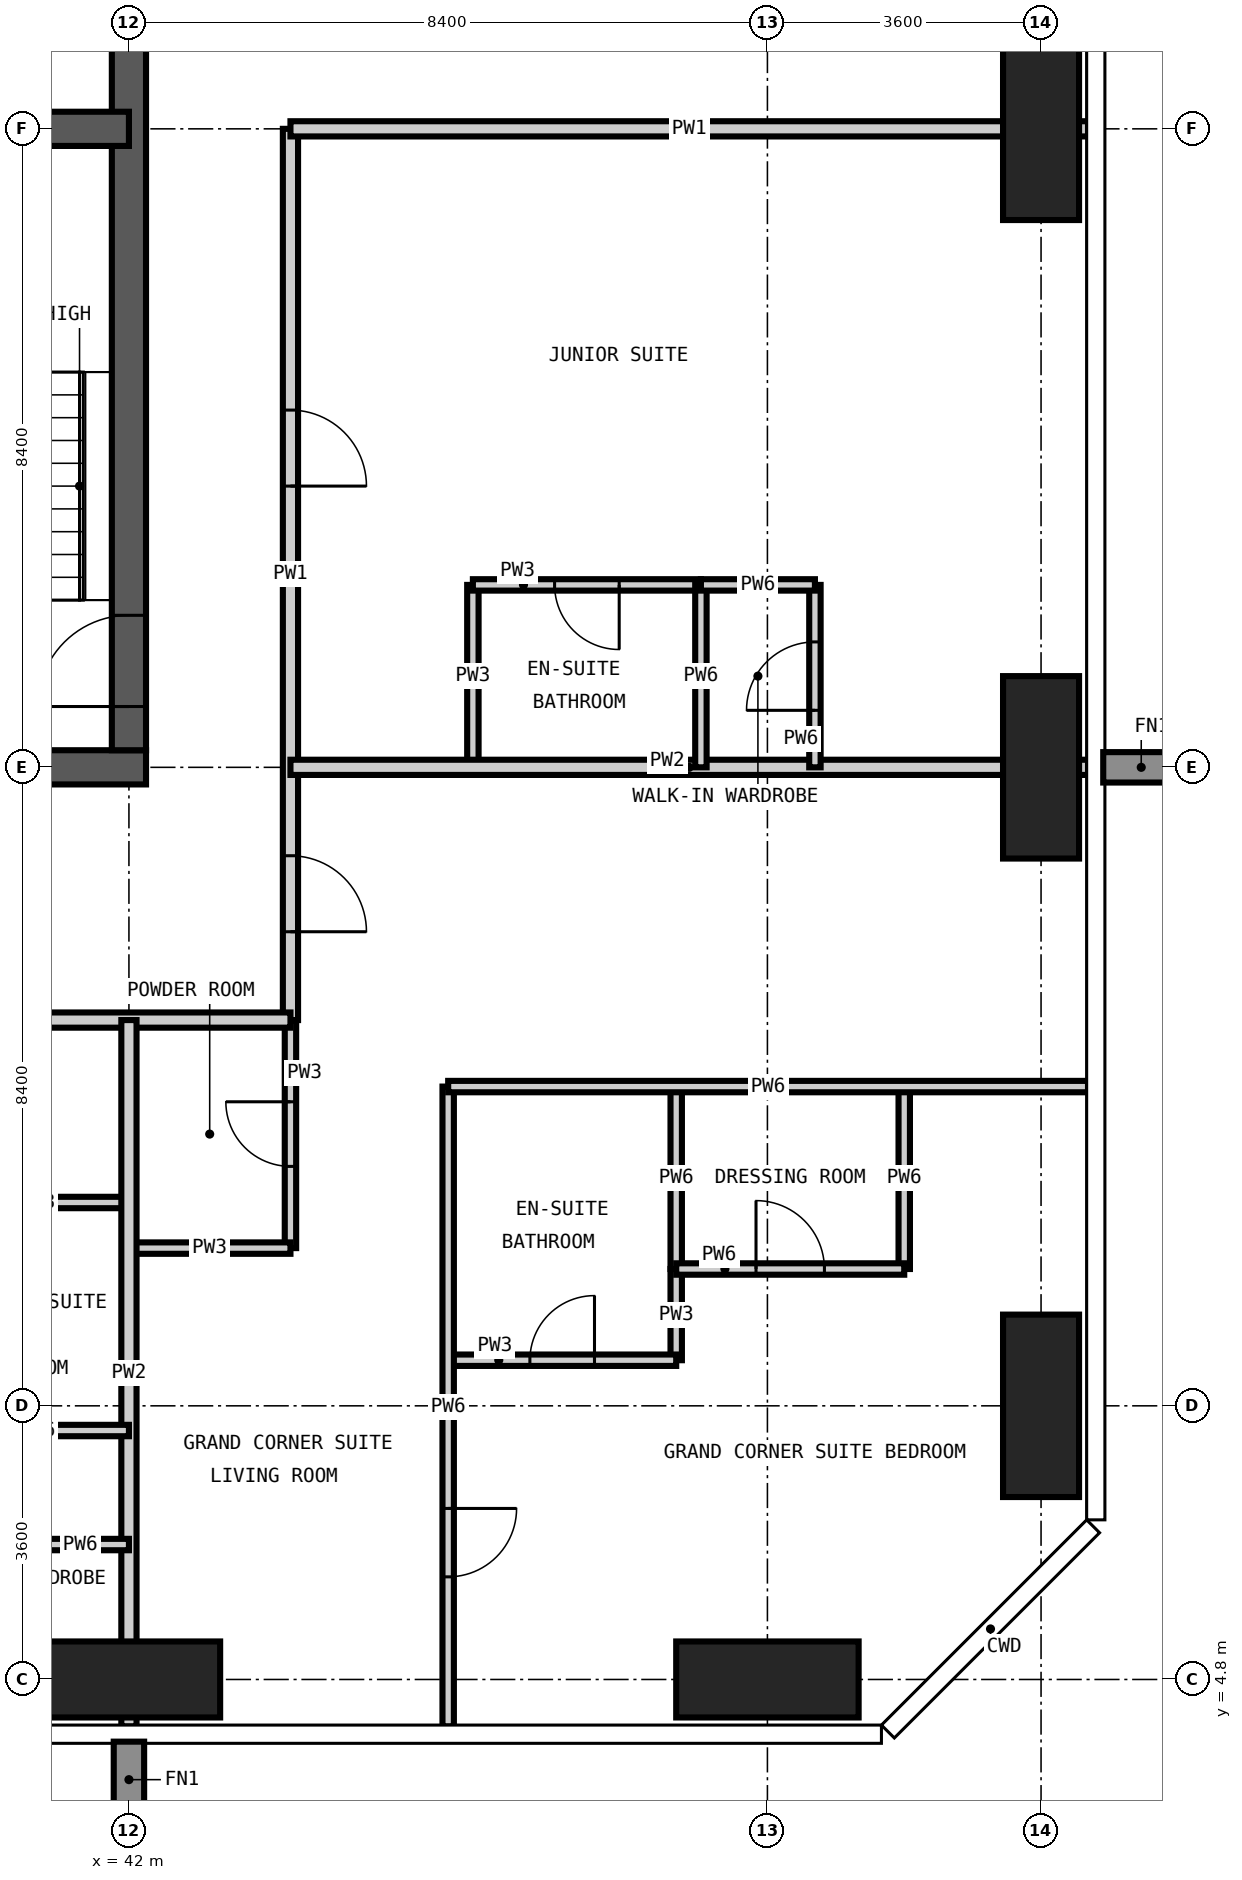
"""IFC4 building model, lengths in metres.
Left out: names, types, materials, properties, quantities, classifications, styles, units other than length and angle.
Written with IfcOpenShell. Run it as: python <this file> out.ifc"""

import sys

from ifc_helpers import new_model, si_unit, direction, frame, frame_2d, origin, origin_2d, place, context, subcontext, project, spatial, rectangle, extrude, element, fill, save


model = new_model("IFC4")
c1 = context("Model", 3, precision=1e-05, world=origin(), true_north=direction((0.0, 1.0)))
c2 = subcontext(c1, "Body", "Model", "MODEL_VIEW")
j1 = project(units=[si_unit("LENGTHUNIT", "METRE"), si_unit("PLANEANGLEUNIT", "RADIAN")], contexts=[c1])
p1 = place(None, origin())
s1 = spatial("IfcSite", under=j1, at=p1, CompositionType="ELEMENT")
p2 = place(p1, origin())
s2 = spatial("IfcBuilding", under=s1, at=p2, CompositionType="ELEMENT")
p3 = place(p2, frame((0.0, 0.0, 276.3)))
s3 = spatial("IfcBuildingStorey", under=s2, at=p3, CompositionType="ELEMENT", Elevation=276.3)
for number, where, z_axis, x_axis in (
    (1, (42.0, 4.8, -0.35), (0.0, 0.0, 1.0), (1.0, 0.0, 0.0)),
    (2, (50.4, 4.8, -0.35), (0.0, 0.0, 1.0), (1.0, 0.0, 0.0)),
):
    element("IfcColumn", number, at=place(p3, frame(where, z_axis=z_axis, x_axis=x_axis)), inside=s3, PredefinedType="COLUMN", context=c2, shape_type="SweptSolid", body=[
        extrude(rectangle(XDim=2.4, YDim=1.0, at=origin_2d()), origin(), (0.0, 0.0, 1.0), 3.9),
    ])
for number, where, z_axis, x_axis in (
    (3, (54.0, 8.4, -0.35), (0.0, 0.0, 1.0), (1.0, 0.0, 0.0)),
    (4, (54.0, 16.8, -0.35), (0.0, 0.0, 1.0), (1.0, 0.0, 0.0)),
    (5, (54.0, 25.2, -0.35), (0.0, 0.0, 1.0), (1.0, 0.0, 0.0)),
):
    element("IfcColumn", number, at=place(p3, frame(where, z_axis=z_axis, x_axis=x_axis)), inside=s3, PredefinedType="COLUMN", context=c2, shape_type="SweptSolid", body=[
        extrude(rectangle(XDim=1.0, YDim=2.4, at=origin_2d()), origin(), (0.0, 0.0, 1.0), 3.9),
    ])
p4 = place(p3, frame((24.975, 16.8, -0.35), z_axis=(0.0, 0.0, 1.0), x_axis=(1.0, 0.0, 0.0)))
e6 = element("IfcWall", 6, at=p4, inside=s3, PredefinedType="SHEAR", context=c2, shape_type="SweptSolid", body=[
    extrude(rectangle(XDim=17.25, YDim=0.45, at=frame_2d((8.625, 0.0))), origin(), (0.0, 0.0, 1.0), 3.9),
])
p5 = place(p4, frame((3.925, 0.0, 0.35)))
e7 = element("IfcOpeningElement", 7, at=p5, cuts=e6, PredefinedType="OPENING", context=c2, shape_type="SweptSolid", body=[
    extrude(rectangle(XDim=1.0, YDim=2.1, at=frame_2d((0.5, 1.05))), frame((0.0, 0.235, 0.0), z_axis=(0.0, -1.0, 0.0), x_axis=(1.0, 0.0, 0.0)), (0.0, 0.0, 1.0), 0.47),
])
p6 = place(p4, frame((10.225, 0.0, 0.35)))
e8 = element("IfcOpeningElement", 8, at=p6, cuts=e6, PredefinedType="OPENING", context=c2, shape_type="SweptSolid", body=[
    extrude(rectangle(XDim=1.0, YDim=2.1, at=frame_2d((0.5, 1.05))), frame((0.0, 0.235, 0.0), z_axis=(0.0, -1.0, 0.0), x_axis=(1.0, 0.0, 0.0)), (0.0, 0.0, 1.0), 0.47),
])
p7 = place(p3, frame((42.0, 17.025, -0.35), z_axis=(0.0, 0.0, 1.0), x_axis=(0.0, 1.0, 0.0)))
e9 = element("IfcWall", 9, at=p7, inside=s3, PredefinedType="SHEAR", context=c2, shape_type="SweptSolid", body=[
    extrude(rectangle(XDim=24.75, YDim=0.45, at=frame_2d((12.375, 0.0))), origin(), (0.0, 0.0, 1.0), 3.9),
])
p8 = place(p7, frame((0.575, 0.0, 0.35)))
e10 = element("IfcOpeningElement", 10, at=p8, cuts=e9, PredefinedType="OPENING", context=c2, shape_type="SweptSolid", body=[
    extrude(rectangle(XDim=1.2, YDim=2.2, at=frame_2d((0.6, 1.1))), frame((0.0, 0.235, 0.0), z_axis=(0.0, -1.0, 0.0), x_axis=(1.0, 0.0, 0.0)), (0.0, 0.0, 1.0), 0.47),
])
p9 = place(p7, frame((11.475, 0.0, 0.35)))
e11 = element("IfcOpeningElement", 11, at=p9, cuts=e9, PredefinedType="OPENING", context=c2, shape_type="SweptSolid", body=[
    extrude(rectangle(XDim=1.8, YDim=2.2, at=frame_2d((0.9, 1.1))), frame((0.0, 0.235, 0.0), z_axis=(0.0, -1.0, 0.0), x_axis=(1.0, 0.0, 0.0)), (0.0, 0.0, 1.0), 0.47),
])
p10 = place(p7, frame((20.275, 0.0, 0.35)))
e12 = element("IfcOpeningElement", 12, at=p10, cuts=e9, PredefinedType="OPENING", context=c2, shape_type="SweptSolid", body=[
    extrude(rectangle(XDim=1.0, YDim=2.1, at=frame_2d((0.5, 1.05))), frame((0.0, 0.235, 0.0), z_axis=(0.0, -1.0, 0.0), x_axis=(1.0, 0.0, 0.0)), (0.0, 0.0, 1.0), 0.47),
])
p11 = place(p3, frame((25.2, 25.2, -0.35), z_axis=(0.0, 0.0, 1.0), x_axis=(1.0, 0.0, 0.0)))
e13 = element("IfcWall", 13, at=p11, inside=s3, PredefinedType="SHEAR", context=c2, shape_type="SweptSolid", body=[
    extrude(rectangle(XDim=16.8, YDim=0.45, at=frame_2d((8.4, 0.0))), origin(), (0.0, 0.0, 1.0), 3.9),
])
p12 = place(p3, frame((44.125, 10.475, 0.0), z_axis=(0.0, 0.0, 1.0), x_axis=(0.0, 1.0, 0.0)))
e14 = element("IfcWall", 14, at=p12, inside=s3, PredefinedType="PARTITIONING", context=c2, shape_type="SweptSolid", body=[
    extrude(rectangle(XDim=3.0, YDim=0.15, at=frame_2d((1.5, 0.0))), origin(), (0.0, 0.0, 1.0), 3.55),
])
p13 = place(p12, frame((1.075, 0.0, 0.0)))
e15 = element("IfcOpeningElement", 15, at=p13, cuts=e14, PredefinedType="OPENING", context=c2, shape_type="SweptSolid", body=[
    extrude(rectangle(XDim=0.85, YDim=2.1, at=frame_2d((0.425, 1.05))), frame((0.0, 0.085, 0.0), z_axis=(0.0, -1.0, 0.0), x_axis=(1.0, 0.0, 0.0)), (0.0, 0.0, 1.0), 0.17),
])
p14 = place(p3, frame((46.525, 16.8, 0.0), z_axis=(0.0, 0.0, 1.0), x_axis=(0.0, 1.0, 0.0)))
e16 = element("IfcWall", 16, at=p14, inside=s3, PredefinedType="PARTITIONING", context=c2, shape_type="SweptSolid", body=[
    extrude(rectangle(XDim=2.4, YDim=0.15, at=frame_2d((1.2, 0.0))), origin(), (0.0, 0.0, 1.0), 3.55),
])
p15 = place(p3, frame((49.2, 9.0, 0.0), z_axis=(0.0, 0.0, 1.0), x_axis=(0.0, 1.0, 0.0)))
e17 = element("IfcWall", 17, at=p15, inside=s3, PredefinedType="PARTITIONING", context=c2, shape_type="SweptSolid", body=[
    extrude(rectangle(XDim=1.2, YDim=0.15, at=frame_2d((0.6, 0.0))), origin(), (0.0, 0.0, 1.0), 3.55),
])
p16 = place(p3, frame((46.2, 9.0, 0.0), z_axis=(0.0, 0.0, 1.0), x_axis=(1.0, 0.0, 0.0)))
e18 = element("IfcWall", 18, at=p16, inside=s3, PredefinedType="PARTITIONING", context=c2, shape_type="SweptSolid", body=[
    extrude(rectangle(XDim=3.0, YDim=0.15, at=frame_2d((1.5, 0.0))), origin(), (0.0, 0.0, 1.0), 3.55),
])
p17 = place(p16, frame((1.075, 0.0, 0.0)))
e19 = element("IfcOpeningElement", 19, at=p17, cuts=e18, PredefinedType="OPENING", context=c2, shape_type="SweptSolid", body=[
    extrude(rectangle(XDim=0.85, YDim=2.1, at=frame_2d((0.425, 1.05))), frame((0.0, 0.085, 0.0), z_axis=(0.0, -1.0, 0.0), x_axis=(1.0, 0.0, 0.0)), (0.0, 0.0, 1.0), 0.17),
])
p18 = place(p3, frame((42.0, 10.475, 0.0), z_axis=(0.0, 0.0, 1.0), x_axis=(1.0, 0.0, 0.0)))
e20 = element("IfcWall", 20, at=p18, inside=s3, PredefinedType="PARTITIONING", context=c2, shape_type="SweptSolid", body=[
    extrude(rectangle(XDim=2.125, YDim=0.15, at=frame_2d((1.062, 0.0))), origin(), (0.0, 0.0, 1.0), 3.55),
])
p19 = place(p3, frame((39.6, 11.075, 0.0), z_axis=(0.0, 0.0, 1.0), x_axis=(1.0, 0.0, 0.0)))
e21 = element("IfcWall", 21, at=p19, inside=s3, PredefinedType="PARTITIONING", context=c2, shape_type="SweptSolid", body=[
    extrude(rectangle(XDim=2.4, YDim=0.15, at=frame_2d((1.2, 0.0))), origin(), (0.0, 0.0, 1.0), 3.55),
])
p20 = place(p3, frame((46.525, 19.2, 0.0), z_axis=(0.0, 0.0, 1.0), x_axis=(1.0, 0.0, 0.0)))
e22 = element("IfcWall", 22, at=p20, inside=s3, PredefinedType="PARTITIONING", context=c2, shape_type="SweptSolid", body=[
    extrude(rectangle(XDim=3.0, YDim=0.15, at=frame_2d((1.5, 0.0))), origin(), (0.0, 0.0, 1.0), 3.55),
])
p21 = place(p20, frame((1.075, 0.0, 0.0)))
e23 = element("IfcOpeningElement", 23, at=p21, cuts=e22, PredefinedType="OPENING", context=c2, shape_type="SweptSolid", body=[
    extrude(rectangle(XDim=0.85, YDim=2.1, at=frame_2d((0.425, 1.05))), frame((0.0, 0.085, 0.0), z_axis=(0.0, -1.0, 0.0), x_axis=(1.0, 0.0, 0.0)), (0.0, 0.0, 1.0), 0.17),
])
p22 = place(p3, frame((44.125, 25.2, 0.0), z_axis=(0.0, 0.0, 1.0), x_axis=(0.0, -1.0, 0.0)))
e24 = element("IfcWall", 24, at=p22, inside=s3, PredefinedType="PARTITIONING", context=c2, shape_type="SweptSolid", body=[
    extrude(rectangle(XDim=11.725, YDim=0.2, at=frame_2d((5.862, 0.0))), origin(), (0.0, 0.0, 1.0), 3.55),
])
p23 = place(p22, frame((3.7, 0.0, 0.0)))
e25 = element("IfcOpeningElement", 25, at=p23, cuts=e24, PredefinedType="OPENING", context=c2, shape_type="SweptSolid", body=[
    extrude(rectangle(XDim=1.0, YDim=2.2, at=frame_2d((0.5, 1.1))), frame((0.0, 0.11, 0.0), z_axis=(0.0, -1.0, 0.0), x_axis=(1.0, 0.0, 0.0)), (0.0, 0.0, 1.0), 0.22),
])
p24 = place(p22, frame((9.563, 0.0, 0.0)))
e26 = element("IfcOpeningElement", 26, at=p24, cuts=e24, PredefinedType="OPENING", context=c2, shape_type="SweptSolid", body=[
    extrude(rectangle(XDim=1.0, YDim=2.2, at=frame_2d((0.5, 1.1))), frame((0.0, 0.11, 0.0), z_axis=(0.0, -1.0, 0.0), x_axis=(1.0, 0.0, 0.0)), (0.0, 0.0, 1.0), 0.22),
])
p25 = place(p3, frame((44.125, 13.475, 0.0), z_axis=(0.0, 0.0, 1.0), x_axis=(-1.0, 0.0, 0.0)))
e27 = element("IfcWall", 27, at=p25, inside=s3, PredefinedType="PARTITIONING", context=c2, shape_type="SweptSolid", body=[
    extrude(rectangle(XDim=22.25, YDim=0.2, at=frame_2d((11.125, 0.0))), origin(), (0.0, 0.0, 1.0), 3.55),
])
p26 = place(p25, frame((11.225, 0.0, 0.0)))
e28 = element("IfcOpeningElement", 28, at=p26, cuts=e27, PredefinedType="OPENING", context=c2, shape_type="SweptSolid", body=[
    extrude(rectangle(XDim=1.0, YDim=2.2, at=frame_2d((0.5, 1.1))), frame((0.0, 0.11, 0.0), z_axis=(0.0, -1.0, 0.0), x_axis=(1.0, 0.0, 0.0)), (0.0, 0.0, 1.0), 0.22),
])
p27 = place(p3, frame((54.618, 25.2, 0.0), z_axis=(0.0, 0.0, 1.0), x_axis=(-1.0, 0.0, 0.0)))
e29 = element("IfcWall", 29, at=p27, inside=s3, PredefinedType="PARTITIONING", context=c2, shape_type="SweptSolid", body=[
    extrude(rectangle(XDim=10.493, YDim=0.2, at=frame_2d((5.247, 0.0))), origin(), (0.0, 0.0, 1.0), 3.55),
])
p28 = place(p3, frame((42.0, 4.182, 0.0), z_axis=(0.0, 0.0, 1.0), x_axis=(0.0, 1.0, 0.0)))
e30 = element("IfcWall", 30, at=p28, inside=s3, PredefinedType="PARTITIONING", context=c2, shape_type="SweptSolid", body=[
    extrude(rectangle(XDim=9.293, YDim=0.2, at=frame_2d((4.646, 0.0))), origin(), (0.0, 0.0, 1.0), 3.55),
])
p29 = place(p3, frame((44.125, 16.8, 0.0), z_axis=(0.0, 0.0, 1.0), x_axis=(1.0, 0.0, 0.0)))
e31 = element("IfcWall", 31, at=p29, inside=s3, PredefinedType="PARTITIONING", context=c2, shape_type="SweptSolid", body=[
    extrude(rectangle(XDim=10.493, YDim=0.2, at=frame_2d((5.247, 0.0))), origin(), (0.0, 0.0, 1.0), 3.55),
])
p30 = place(p3, frame((46.2, 4.182, 0.0), z_axis=(0.0, 0.0, 1.0), x_axis=(0.0, 1.0, 0.0)))
e32 = element("IfcWall", 32, at=p30, inside=s3, PredefinedType="PARTITIONING", context=c2, shape_type="SweptSolid", body=[
    extrude(rectangle(XDim=8.418, YDim=0.15, at=frame_2d((4.209, 0.0))), origin(), (0.0, 0.0, 1.0), 3.55),
])
p31 = place(p30, frame((1.968, 0.0, 0.0)))
e33 = element("IfcOpeningElement", 33, at=p31, cuts=e32, PredefinedType="OPENING", context=c2, shape_type="SweptSolid", body=[
    extrude(rectangle(XDim=0.9, YDim=2.1, at=frame_2d((0.45, 1.05))), frame((0.0, 0.085, 0.0), z_axis=(0.0, -1.0, 0.0), x_axis=(1.0, 0.0, 0.0)), (0.0, 0.0, 1.0), 0.17),
])
p32 = place(p3, frame((49.2, 10.2, 0.0), z_axis=(0.0, 0.0, 1.0), x_axis=(0.0, 1.0, 0.0)))
e34 = element("IfcWall", 34, at=p32, inside=s3, PredefinedType="PARTITIONING", context=c2, shape_type="SweptSolid", body=[
    extrude(rectangle(XDim=2.4, YDim=0.15, at=frame_2d((1.2, 0.0))), origin(), (0.0, 0.0, 1.0), 3.55),
])
p33 = place(p3, frame((49.525, 16.8, 0.0), z_axis=(0.0, 0.0, 1.0), x_axis=(0.0, 1.0, 0.0)))
e35 = element("IfcWall", 35, at=p33, inside=s3, PredefinedType="PARTITIONING", context=c2, shape_type="SweptSolid", body=[
    extrude(rectangle(XDim=2.4, YDim=0.15, at=frame_2d((1.2, 0.0))), origin(), (0.0, 0.0, 1.0), 3.55),
])
p34 = place(p3, frame((51.025, 16.8, 0.0), z_axis=(0.0, 0.0, 1.0), x_axis=(0.0, 1.0, 0.0)))
e36 = element("IfcWall", 36, at=p34, inside=s3, PredefinedType="PARTITIONING", context=c2, shape_type="SweptSolid", body=[
    extrude(rectangle(XDim=2.4, YDim=0.15, at=frame_2d((1.2, 0.0))), origin(), (0.0, 0.0, 1.0), 3.55),
])
p35 = place(p34, frame((0.75, 0.0, 0.0)))
e37 = element("IfcOpeningElement", 37, at=p35, cuts=e36, PredefinedType="OPENING", context=c2, shape_type="SweptSolid", body=[
    extrude(rectangle(XDim=0.9, YDim=2.1, at=frame_2d((0.45, 1.05))), frame((0.0, 0.085, 0.0), z_axis=(0.0, -1.0, 0.0), x_axis=(1.0, 0.0, 0.0)), (0.0, 0.0, 1.0), 0.17),
])
p36 = place(p3, frame((52.2, 10.2, 0.0), z_axis=(0.0, 0.0, 1.0), x_axis=(0.0, 1.0, 0.0)))
e38 = element("IfcWall", 38, at=p36, inside=s3, PredefinedType="PARTITIONING", context=c2, shape_type="SweptSolid", body=[
    extrude(rectangle(XDim=2.4, YDim=0.15, at=frame_2d((1.2, 0.0))), origin(), (0.0, 0.0, 1.0), 3.55),
])
p37 = place(p3, frame((39.6, 6.575, 0.0), z_axis=(0.0, 0.0, 1.0), x_axis=(1.0, 0.0, 0.0)))
e39 = element("IfcWall", 39, at=p37, inside=s3, PredefinedType="PARTITIONING", context=c2, shape_type="SweptSolid", body=[
    extrude(rectangle(XDim=2.4, YDim=0.15, at=frame_2d((1.2, 0.0))), origin(), (0.0, 0.0, 1.0), 3.55),
])
p38 = place(p37, frame((0.25, 0.0, 0.0)))
e40 = element("IfcOpeningElement", 40, at=p38, cuts=e39, PredefinedType="OPENING", context=c2, shape_type="SweptSolid", body=[
    extrude(rectangle(XDim=0.9, YDim=2.1, at=frame_2d((0.45, 1.05))), frame((0.0, 0.085, 0.0), z_axis=(0.0, -1.0, 0.0), x_axis=(1.0, 0.0, 0.0)), (0.0, 0.0, 1.0), 0.17),
])
p39 = place(p3, frame((39.6, 8.075, 0.0), z_axis=(0.0, 0.0, 1.0), x_axis=(1.0, 0.0, 0.0)))
e41 = element("IfcWall", 41, at=p39, inside=s3, PredefinedType="PARTITIONING", context=c2, shape_type="SweptSolid", body=[
    extrude(rectangle(XDim=2.4, YDim=0.15, at=frame_2d((1.2, 0.0))), origin(), (0.0, 0.0, 1.0), 3.55),
])
p40 = place(p3, frame((49.2, 10.2, 0.0), z_axis=(0.0, 0.0, 1.0), x_axis=(1.0, 0.0, 0.0)))
e42 = element("IfcWall", 42, at=p40, inside=s3, PredefinedType="PARTITIONING", context=c2, shape_type="SweptSolid", body=[
    extrude(rectangle(XDim=3.0, YDim=0.15, at=frame_2d((1.5, 0.0))), origin(), (0.0, 0.0, 1.0), 3.55),
])
p41 = place(p40, frame((1.05, 0.0, 0.0)))
e43 = element("IfcOpeningElement", 43, at=p41, cuts=e42, PredefinedType="OPENING", context=c2, shape_type="SweptSolid", body=[
    extrude(rectangle(XDim=0.9, YDim=2.1, at=frame_2d((0.45, 1.05))), frame((0.0, 0.085, 0.0), z_axis=(0.0, -1.0, 0.0), x_axis=(1.0, 0.0, 0.0)), (0.0, 0.0, 1.0), 0.17),
])
p42 = place(p3, frame((46.2, 12.6, 0.0), z_axis=(0.0, 0.0, 1.0), x_axis=(1.0, 0.0, 0.0)))
e44 = element("IfcWall", 44, at=p42, inside=s3, PredefinedType="PARTITIONING", context=c2, shape_type="SweptSolid", body=[
    extrude(rectangle(XDim=8.418, YDim=0.15, at=frame_2d((4.209, 0.0))), origin(), (0.0, 0.0, 1.0), 3.55),
])
p43 = place(p3, frame((49.525, 19.2, 0.0), z_axis=(0.0, 0.0, 1.0), x_axis=(1.0, 0.0, 0.0)))
e45 = element("IfcWall", 45, at=p43, inside=s3, PredefinedType="PARTITIONING", context=c2, shape_type="SweptSolid", body=[
    extrude(rectangle(XDim=1.5, YDim=0.15, at=frame_2d((0.75, 0.0))), origin(), (0.0, 0.0, 1.0), 3.55),
])
p44 = place(p8, origin())
e46 = element("IfcDoor", 46, at=p44, inside=s3, OperationType="SINGLE_SWING_LEFT", PredefinedType="DOOR", context=c2, shape_type="SweptSolid", body=[
    extrude(rectangle(XDim=1.2, YDim=2.2, at=frame_2d((0.6, 1.1))), frame((0.0, 0.025, 0.0), z_axis=(0.0, -1.0, 0.0), x_axis=(1.0, 0.0, 0.0)), (0.0, 0.0, 1.0), 0.05),
])
fill(e10, e46)
p45 = place(p23, origin())
e47 = element("IfcDoor", 47, at=p45, inside=s3, OperationType="SINGLE_SWING_RIGHT", PredefinedType="DOOR", context=c2, shape_type="SweptSolid", body=[
    extrude(rectangle(XDim=1.0, YDim=2.2, at=frame_2d((0.5, 1.1))), frame((0.0, 0.025, 0.0), z_axis=(0.0, -1.0, 0.0), x_axis=(1.0, 0.0, 0.0)), (0.0, 0.0, 1.0), 0.05),
])
fill(e25, e47)
p46 = place(p21, frame((0.85, 0.0, 0.0), z_axis=(0.0, 0.0, 1.0), x_axis=(-1.0, 0.0, 0.0)))
e48 = element("IfcDoor", 48, at=p46, inside=s3, OperationType="SINGLE_SWING_LEFT", PredefinedType="DOOR", context=c2, shape_type="SweptSolid", body=[
    extrude(rectangle(XDim=0.85, YDim=2.1, at=frame_2d((0.425, 1.05))), frame((0.0, 0.025, 0.0), z_axis=(0.0, -1.0, 0.0), x_axis=(1.0, 0.0, 0.0)), (0.0, 0.0, 1.0), 0.05),
])
fill(e23, e48)
p47 = place(p35, origin())
e49 = element("IfcDoor", 49, at=p47, inside=s3, OperationType="SINGLE_SWING_LEFT", PredefinedType="DOOR", context=c2, shape_type="SweptSolid", body=[
    extrude(rectangle(XDim=0.9, YDim=2.1, at=frame_2d((0.45, 1.05))), frame((0.0, 0.025, 0.0), z_axis=(0.0, -1.0, 0.0), x_axis=(1.0, 0.0, 0.0)), (0.0, 0.0, 1.0), 0.05),
])
fill(e37, e49)
p48 = place(p24, origin())
e50 = element("IfcDoor", 50, at=p48, inside=s3, OperationType="SINGLE_SWING_RIGHT", PredefinedType="DOOR", context=c2, shape_type="SweptSolid", body=[
    extrude(rectangle(XDim=1.0, YDim=2.2, at=frame_2d((0.5, 1.1))), frame((0.0, 0.025, 0.0), z_axis=(0.0, -1.0, 0.0), x_axis=(1.0, 0.0, 0.0)), (0.0, 0.0, 1.0), 0.05),
])
fill(e26, e50)
p49 = place(p13, origin())
e51 = element("IfcDoor", 51, at=p49, inside=s3, OperationType="SINGLE_SWING_RIGHT", PredefinedType="DOOR", context=c2, shape_type="SweptSolid", body=[
    extrude(rectangle(XDim=0.85, YDim=2.1, at=frame_2d((0.425, 1.05))), frame((0.0, 0.025, 0.0), z_axis=(0.0, -1.0, 0.0), x_axis=(1.0, 0.0, 0.0)), (0.0, 0.0, 1.0), 0.05),
])
fill(e15, e51)
p50 = place(p31, frame((0.9, 0.0, 0.0), z_axis=(0.0, 0.0, 1.0), x_axis=(-1.0, 0.0, 0.0)))
e52 = element("IfcDoor", 52, at=p50, inside=s3, OperationType="SINGLE_SWING_LEFT", PredefinedType="DOOR", context=c2, shape_type="SweptSolid", body=[
    extrude(rectangle(XDim=0.9, YDim=2.1, at=frame_2d((0.45, 1.05))), frame((0.0, 0.025, 0.0), z_axis=(0.0, -1.0, 0.0), x_axis=(1.0, 0.0, 0.0)), (0.0, 0.0, 1.0), 0.05),
])
fill(e33, e52)
p51 = place(p17, origin())
e53 = element("IfcDoor", 53, at=p51, inside=s3, OperationType="SINGLE_SWING_RIGHT", PredefinedType="DOOR", context=c2, shape_type="SweptSolid", body=[
    extrude(rectangle(XDim=0.85, YDim=2.1, at=frame_2d((0.425, 1.05))), frame((0.0, 0.025, 0.0), z_axis=(0.0, -1.0, 0.0), x_axis=(1.0, 0.0, 0.0)), (0.0, 0.0, 1.0), 0.05),
])
fill(e19, e53)
p52 = place(p41, origin())
e54 = element("IfcDoor", 54, at=p52, inside=s3, OperationType="SINGLE_SWING_LEFT", PredefinedType="DOOR", context=c2, shape_type="SweptSolid", body=[
    extrude(rectangle(XDim=0.9, YDim=2.1, at=frame_2d((0.45, 1.05))), frame((0.0, 0.025, 0.0), z_axis=(0.0, -1.0, 0.0), x_axis=(1.0, 0.0, 0.0)), (0.0, 0.0, 1.0), 0.05),
])
fill(e43, e54)
save(model, sys.argv[1])
